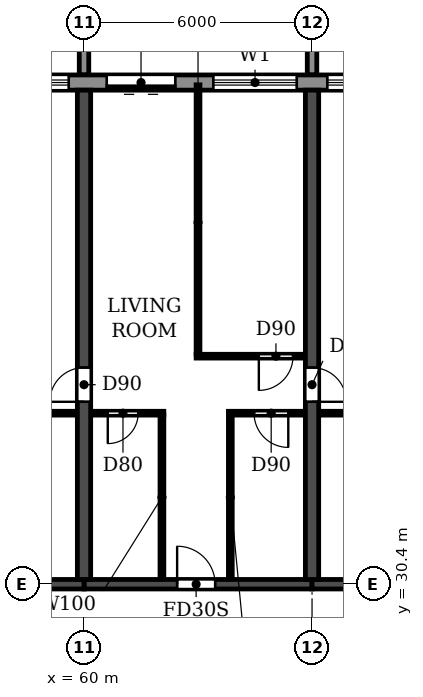
"""IFC4 building model, lengths in metres.
Left out: names, types, materials, properties, quantities, classifications, styles, units other than length and angle.
Written with IfcOpenShell. Run it as: python <this file> out.ifc"""

import sys

from ifc_helpers import new_model, si_unit, direction, frame, frame_2d, origin, place, context, subcontext, project, spatial, polyline, rectangle, outline, extrude, source, transform, mapped, element, fill, save


model = new_model("IFC4")
c1 = context("Model", 3, precision=1e-05, world=origin(), true_north=direction((0.0, 1.0)))
c2 = subcontext(c1, "Body", "Model", "MODEL_VIEW")
j1 = project(units=[si_unit("LENGTHUNIT", "METRE"), si_unit("PLANEANGLEUNIT", "RADIAN")], contexts=[c1])
p1 = place(None, origin())
s1 = spatial("IfcSite", under=j1, at=p1, CompositionType="ELEMENT")
p2 = place(p1, origin())
s2 = spatial("IfcBuilding", under=s1, at=p2, CompositionType="ELEMENT")
p3 = place(p2, frame((0.0, 0.0, 82.8)))
s3 = spatial("IfcBuildingStorey", under=s2, at=p3, CompositionType="ELEMENT", Elevation=82.8)
p4 = place(p3, frame((60.0, 30.525, 0.0), z_axis=(0.0, 0.0, 1.0), x_axis=(0.0, 1.0, 0.0)))
e1 = element("IfcWall", 1, at=p4, inside=s3, PredefinedType="SHEAR", context=c2, shape_type="SweptSolid", body=[
    extrude(rectangle(XDim=12.875, YDim=0.35, at=frame_2d((6.438, 0.0))), origin(), (0.0, 0.0, 1.0), 3.06),
])
p5 = place(p4, frame((4.675, 0.0, 0.0)))
e2 = element("IfcOpeningElement", 2, at=p5, cuts=e1, PredefinedType="OPENING", context=c2, shape_type="SweptSolid", body=[
    extrude(rectangle(XDim=0.9, YDim=2.1, at=frame_2d((0.45, 1.05))), frame((0.0, 0.185, 0.0), z_axis=(0.0, -1.0, 0.0), x_axis=(1.0, 0.0, 0.0)), (0.0, 0.0, 1.0), 0.37),
])
p6 = place(p3, frame((66.0, 30.525, 0.0), z_axis=(0.0, 0.0, 1.0), x_axis=(0.0, 1.0, 0.0)))
e3 = element("IfcWall", 3, at=p6, inside=s3, PredefinedType="SHEAR", context=c2, shape_type="SweptSolid", body=[
    extrude(rectangle(XDim=12.875, YDim=0.35, at=frame_2d((6.438, 0.0))), origin(), (0.0, 0.0, 1.0), 3.06),
])
p7 = place(p6, frame((4.675, 0.0, 0.0)))
e4 = element("IfcOpeningElement", 4, at=p7, cuts=e3, PredefinedType="OPENING", context=c2, shape_type="SweptSolid", body=[
    extrude(rectangle(XDim=0.9, YDim=2.1, at=frame_2d((0.45, 1.05))), frame((0.0, 0.185, 0.0), z_axis=(0.0, -1.0, 0.0), x_axis=(1.0, 0.0, 0.0)), (0.0, 0.0, 1.0), 0.37),
])
p8 = place(p3, frame((54.0, 30.4, 0.0), z_axis=(0.0, 0.0, 1.0), x_axis=(1.0, 0.0, 0.0)))
e5 = element("IfcWall", 5, at=p8, inside=s3, PredefinedType="SHEAR", context=c2, shape_type="SweptSolid", body=[
    extrude(rectangle(XDim=6.0, YDim=0.25, at=frame_2d((3.0, 0.0))), origin(), (0.0, 0.0, 1.0), 2.46),
])
p9 = place(p3, frame((60.0, 30.4, 0.0), z_axis=(0.0, 0.0, 1.0), x_axis=(1.0, 0.0, 0.0)))
e6 = element("IfcWall", 6, at=p9, inside=s3, PredefinedType="SHEAR", context=c2, shape_type="SweptSolid", body=[
    extrude(rectangle(XDim=6.0, YDim=0.25, at=frame_2d((3.0, 0.0))), origin(), (0.0, 0.0, 1.0), 2.46),
])
p10 = place(p9, frame((2.45, 0.0, 0.0)))
e7 = element("IfcOpeningElement", 7, at=p10, cuts=e6, PredefinedType="OPENING", context=c2, shape_type="SweptSolid", body=[
    extrude(rectangle(XDim=1.0, YDim=2.1, at=frame_2d((0.5, 1.05))), frame((0.0, 0.135, 0.0), z_axis=(0.0, -1.0, 0.0), x_axis=(1.0, 0.0, 0.0)), (0.0, 0.0, 1.0), 0.27),
])
p11 = place(p3, frame((66.0, 30.4, 0.0), z_axis=(0.0, 0.0, 1.0), x_axis=(1.0, 0.0, 0.0)))
e8 = element("IfcWall", 8, at=p11, inside=s3, PredefinedType="SHEAR", context=c2, shape_type="SweptSolid", body=[
    extrude(rectangle(XDim=6.0, YDim=0.25, at=frame_2d((3.0, 0.0))), origin(), (0.0, 0.0, 1.0), 2.46),
])
p12 = place(p3, frame((91.317, 43.6, 0.0), z_axis=(0.0, 0.0, 1.0), x_axis=(-1.0, 0.0, 0.0)))
e9 = element("IfcWall", 9, at=p12, inside=s3, PredefinedType="STANDARD", context=c2, shape_type="SweptSolid", body=[
    extrude(rectangle(XDim=80.634, YDim=0.4, at=frame_2d((40.317, 0.0))), origin(), (0.0, 0.0, 1.0), 3.06),
])
p13 = place(p12, frame((76.717, 0.0, 0.9)))
e10 = element("IfcOpeningElement", 10, at=p13, cuts=e9, PredefinedType="OPENING", context=c2, shape_type="SweptSolid", body=[
    extrude(rectangle(XDim=2.2, YDim=1.5, at=frame_2d((1.1, 0.75))), frame((0.0, 0.21, 0.0), z_axis=(0.0, -1.0, 0.0), x_axis=(1.0, 0.0, 0.0)), (0.0, 0.0, 1.0), 0.42),
])
p14 = place(p12, frame((73.917, 0.0, 0.0)))
e11 = element("IfcOpeningElement", 11, at=p14, cuts=e9, PredefinedType="OPENING", context=c2, shape_type="SweptSolid", body=[
    extrude(rectangle(XDim=1.8, YDim=2.4, at=frame_2d((0.9, 1.2))), frame((0.0, 0.21, 0.0), z_axis=(0.0, -1.0, 0.0), x_axis=(1.0, 0.0, 0.0)), (0.0, 0.0, 1.0), 0.42),
])
p15 = place(p12, frame((70.717, 0.0, 0.9)))
e12 = element("IfcOpeningElement", 12, at=p15, cuts=e9, PredefinedType="OPENING", context=c2, shape_type="SweptSolid", body=[
    extrude(rectangle(XDim=2.2, YDim=1.5, at=frame_2d((1.1, 0.75))), frame((0.0, 0.21, 0.0), z_axis=(0.0, -1.0, 0.0), x_axis=(1.0, 0.0, 0.0)), (0.0, 0.0, 1.0), 0.42),
])
p16 = place(p12, frame((67.717, 0.0, 0.9)))
e13 = element("IfcOpeningElement", 13, at=p16, cuts=e9, PredefinedType="OPENING", context=c2, shape_type="SweptSolid", body=[
    extrude(rectangle(XDim=2.2, YDim=1.5, at=frame_2d((1.1, 0.75))), frame((0.0, 0.21, 0.0), z_axis=(0.0, -1.0, 0.0), x_axis=(1.0, 0.0, 0.0)), (0.0, 0.0, 1.0), 0.42),
])
p17 = place(p12, frame((64.717, 0.0, 0.9)))
e14 = element("IfcOpeningElement", 14, at=p17, cuts=e9, PredefinedType="OPENING", context=c2, shape_type="SweptSolid", body=[
    extrude(rectangle(XDim=2.2, YDim=1.5, at=frame_2d((1.1, 0.75))), frame((0.0, 0.21, 0.0), z_axis=(0.0, -1.0, 0.0), x_axis=(1.0, 0.0, 0.0)), (0.0, 0.0, 1.0), 0.42),
])
p18 = place(p12, frame((61.917, 0.0, 0.0)))
e15 = element("IfcOpeningElement", 15, at=p18, cuts=e9, PredefinedType="OPENING", context=c2, shape_type="SweptSolid", body=[
    extrude(rectangle(XDim=1.8, YDim=2.4, at=frame_2d((0.9, 1.2))), frame((0.0, 0.21, 0.0), z_axis=(0.0, -1.0, 0.0), x_axis=(1.0, 0.0, 0.0)), (0.0, 0.0, 1.0), 0.42),
])
p19 = place(p12, frame((58.917, 0.0, 0.0)))
e16 = element("IfcOpeningElement", 16, at=p19, cuts=e9, PredefinedType="OPENING", context=c2, shape_type="SweptSolid", body=[
    extrude(rectangle(XDim=1.8, YDim=2.4, at=frame_2d((0.9, 1.2))), frame((0.0, 0.21, 0.0), z_axis=(0.0, -1.0, 0.0), x_axis=(1.0, 0.0, 0.0)), (0.0, 0.0, 1.0), 0.42),
])
p20 = place(p12, frame((55.717, 0.0, 0.9)))
e17 = element("IfcOpeningElement", 17, at=p20, cuts=e9, PredefinedType="OPENING", context=c2, shape_type="SweptSolid", body=[
    extrude(rectangle(XDim=2.2, YDim=1.5, at=frame_2d((1.1, 0.75))), frame((0.0, 0.21, 0.0), z_axis=(0.0, -1.0, 0.0), x_axis=(1.0, 0.0, 0.0)), (0.0, 0.0, 1.0), 0.42),
])
p21 = place(p12, frame((52.717, 0.0, 0.9)))
e18 = element("IfcOpeningElement", 18, at=p21, cuts=e9, PredefinedType="OPENING", context=c2, shape_type="SweptSolid", body=[
    extrude(rectangle(XDim=2.2, YDim=1.5, at=frame_2d((1.1, 0.75))), frame((0.0, 0.21, 0.0), z_axis=(0.0, -1.0, 0.0), x_axis=(1.0, 0.0, 0.0)), (0.0, 0.0, 1.0), 0.42),
])
p22 = place(p12, frame((49.917, 0.0, 0.0)))
e19 = element("IfcOpeningElement", 19, at=p22, cuts=e9, PredefinedType="OPENING", context=c2, shape_type="SweptSolid", body=[
    extrude(rectangle(XDim=1.8, YDim=2.4, at=frame_2d((0.9, 1.2))), frame((0.0, 0.21, 0.0), z_axis=(0.0, -1.0, 0.0), x_axis=(1.0, 0.0, 0.0)), (0.0, 0.0, 1.0), 0.42),
])
p23 = place(p12, frame((46.717, 0.0, 0.9)))
e20 = element("IfcOpeningElement", 20, at=p23, cuts=e9, PredefinedType="OPENING", context=c2, shape_type="SweptSolid", body=[
    extrude(rectangle(XDim=2.2, YDim=1.5, at=frame_2d((1.1, 0.75))), frame((0.0, 0.21, 0.0), z_axis=(0.0, -1.0, 0.0), x_axis=(1.0, 0.0, 0.0)), (0.0, 0.0, 1.0), 0.42),
])
p24 = place(p12, frame((43.717, 0.0, 0.9)))
e21 = element("IfcOpeningElement", 21, at=p24, cuts=e9, PredefinedType="OPENING", context=c2, shape_type="SweptSolid", body=[
    extrude(rectangle(XDim=2.2, YDim=1.5, at=frame_2d((1.1, 0.75))), frame((0.0, 0.21, 0.0), z_axis=(0.0, -1.0, 0.0), x_axis=(1.0, 0.0, 0.0)), (0.0, 0.0, 1.0), 0.42),
])
p25 = place(p12, frame((40.717, 0.0, 0.9)))
e22 = element("IfcOpeningElement", 22, at=p25, cuts=e9, PredefinedType="OPENING", context=c2, shape_type="SweptSolid", body=[
    extrude(rectangle(XDim=2.2, YDim=1.5, at=frame_2d((1.1, 0.75))), frame((0.0, 0.21, 0.0), z_axis=(0.0, -1.0, 0.0), x_axis=(1.0, 0.0, 0.0)), (0.0, 0.0, 1.0), 0.42),
])
p26 = place(p12, frame((37.917, 0.0, 0.0)))
e23 = element("IfcOpeningElement", 23, at=p26, cuts=e9, PredefinedType="OPENING", context=c2, shape_type="SweptSolid", body=[
    extrude(rectangle(XDim=1.8, YDim=2.4, at=frame_2d((0.9, 1.2))), frame((0.0, 0.21, 0.0), z_axis=(0.0, -1.0, 0.0), x_axis=(1.0, 0.0, 0.0)), (0.0, 0.0, 1.0), 0.42),
])
p27 = place(p12, frame((34.717, 0.0, 0.9)))
e24 = element("IfcOpeningElement", 24, at=p27, cuts=e9, PredefinedType="OPENING", context=c2, shape_type="SweptSolid", body=[
    extrude(rectangle(XDim=2.2, YDim=1.5, at=frame_2d((1.1, 0.75))), frame((0.0, 0.21, 0.0), z_axis=(0.0, -1.0, 0.0), x_axis=(1.0, 0.0, 0.0)), (0.0, 0.0, 1.0), 0.42),
])
p28 = place(p12, frame((31.717, 0.0, 0.9)))
e25 = element("IfcOpeningElement", 25, at=p28, cuts=e9, PredefinedType="OPENING", context=c2, shape_type="SweptSolid", body=[
    extrude(rectangle(XDim=2.2, YDim=1.5, at=frame_2d((1.1, 0.75))), frame((0.0, 0.21, 0.0), z_axis=(0.0, -1.0, 0.0), x_axis=(1.0, 0.0, 0.0)), (0.0, 0.0, 1.0), 0.42),
])
p29 = place(p12, frame((28.917, 0.0, 0.0)))
e26 = element("IfcOpeningElement", 26, at=p29, cuts=e9, PredefinedType="OPENING", context=c2, shape_type="SweptSolid", body=[
    extrude(rectangle(XDim=1.8, YDim=2.4, at=frame_2d((0.9, 1.2))), frame((0.0, 0.21, 0.0), z_axis=(0.0, -1.0, 0.0), x_axis=(1.0, 0.0, 0.0)), (0.0, 0.0, 1.0), 0.42),
])
p30 = place(p12, frame((25.717, 0.0, 0.9)))
e27 = element("IfcOpeningElement", 27, at=p30, cuts=e9, PredefinedType="OPENING", context=c2, shape_type="SweptSolid", body=[
    extrude(rectangle(XDim=2.2, YDim=1.5, at=frame_2d((1.1, 0.75))), frame((0.0, 0.21, 0.0), z_axis=(0.0, -1.0, 0.0), x_axis=(1.0, 0.0, 0.0)), (0.0, 0.0, 1.0), 0.42),
])
p31 = place(p12, frame((22.717, 0.0, 0.9)))
e28 = element("IfcOpeningElement", 28, at=p31, cuts=e9, PredefinedType="OPENING", context=c2, shape_type="SweptSolid", body=[
    extrude(rectangle(XDim=2.2, YDim=1.5, at=frame_2d((1.1, 0.75))), frame((0.0, 0.21, 0.0), z_axis=(0.0, -1.0, 0.0), x_axis=(1.0, 0.0, 0.0)), (0.0, 0.0, 1.0), 0.42),
])
p32 = place(p12, frame((19.717, 0.0, 0.9)))
e29 = element("IfcOpeningElement", 29, at=p32, cuts=e9, PredefinedType="OPENING", context=c2, shape_type="SweptSolid", body=[
    extrude(rectangle(XDim=2.2, YDim=1.5, at=frame_2d((1.1, 0.75))), frame((0.0, 0.21, 0.0), z_axis=(0.0, -1.0, 0.0), x_axis=(1.0, 0.0, 0.0)), (0.0, 0.0, 1.0), 0.42),
])
p33 = place(p12, frame((16.717, 0.0, 0.9)))
e30 = element("IfcOpeningElement", 30, at=p33, cuts=e9, PredefinedType="OPENING", context=c2, shape_type="SweptSolid", body=[
    extrude(rectangle(XDim=2.2, YDim=1.5, at=frame_2d((1.1, 0.75))), frame((0.0, 0.21, 0.0), z_axis=(0.0, -1.0, 0.0), x_axis=(1.0, 0.0, 0.0)), (0.0, 0.0, 1.0), 0.42),
])
p34 = place(p12, frame((13.917, 0.0, 0.0)))
e31 = element("IfcOpeningElement", 31, at=p34, cuts=e9, PredefinedType="OPENING", context=c2, shape_type="SweptSolid", body=[
    extrude(rectangle(XDim=1.8, YDim=2.4, at=frame_2d((0.9, 1.2))), frame((0.0, 0.21, 0.0), z_axis=(0.0, -1.0, 0.0), x_axis=(1.0, 0.0, 0.0)), (0.0, 0.0, 1.0), 0.42),
])
p35 = place(p12, frame((10.717, 0.0, 0.9)))
e32 = element("IfcOpeningElement", 32, at=p35, cuts=e9, PredefinedType="OPENING", context=c2, shape_type="SweptSolid", body=[
    extrude(rectangle(XDim=2.2, YDim=1.5, at=frame_2d((1.1, 0.75))), frame((0.0, 0.21, 0.0), z_axis=(0.0, -1.0, 0.0), x_axis=(1.0, 0.0, 0.0)), (0.0, 0.0, 1.0), 0.42),
])
p36 = place(p12, frame((7.717, 0.0, 0.9)))
e33 = element("IfcOpeningElement", 33, at=p36, cuts=e9, PredefinedType="OPENING", context=c2, shape_type="SweptSolid", body=[
    extrude(rectangle(XDim=2.2, YDim=1.5, at=frame_2d((1.1, 0.75))), frame((0.0, 0.21, 0.0), z_axis=(0.0, -1.0, 0.0), x_axis=(1.0, 0.0, 0.0)), (0.0, 0.0, 1.0), 0.42),
])
p37 = place(p12, frame((4.917, 0.0, 0.0)))
e34 = element("IfcOpeningElement", 34, at=p37, cuts=e9, PredefinedType="OPENING", context=c2, shape_type="SweptSolid", body=[
    extrude(rectangle(XDim=1.8, YDim=2.4, at=frame_2d((0.9, 1.2))), frame((0.0, 0.21, 0.0), z_axis=(0.0, -1.0, 0.0), x_axis=(1.0, 0.0, 0.0)), (0.0, 0.0, 1.0), 0.42),
])
p38 = place(p12, frame((1.717, 0.0, 0.9)))
e35 = element("IfcOpeningElement", 35, at=p38, cuts=e9, PredefinedType="OPENING", context=c2, shape_type="SweptSolid", body=[
    extrude(rectangle(XDim=2.2, YDim=1.5, at=frame_2d((1.1, 0.75))), frame((0.0, 0.21, 0.0), z_axis=(0.0, -1.0, 0.0), x_axis=(1.0, 0.0, 0.0)), (0.0, 0.0, 1.0), 0.42),
])
m1 = source(origin(), c2, "Body", "SweptSolid", [
    extrude(outline(polyline([(0.0, 0.0), (0.25, 0.0), (0.25, 3.1), (0.0, 3.1), (0.0, 0.0)])), origin(), (0.0, 0.0, 1.0), 3.1),
])
for number, where in (
    (36, (59.875, 43.8, 0.0)),
    (37, (65.875, 43.8, 0.0)),
):
    element("IfcWall", number, at=place(p3, frame(where)), inside=s3, PredefinedType="STANDARD", context=c2, shape_type="MappedRepresentation", body=[
        mapped(m1, transform((0.0, 0.0, 0.0))),
    ])
p39 = place(p3, frame((57.1, 34.9, 0.0), z_axis=(0.0, 0.0, 1.0), x_axis=(1.0, 0.0, 0.0)))
e38 = element("IfcWall", 38, at=p39, inside=s3, PredefinedType="PARTITIONING", context=c2, shape_type="SweptSolid", body=[
    extrude(rectangle(XDim=2.715, YDim=0.1, at=frame_2d((1.357, 0.0))), origin(), (0.0, 0.0, 1.0), 3.06),
])
p40 = place(p39, frame((1.0, 0.0, 0.0)))
e39 = element("IfcOpeningElement", 39, at=p40, cuts=e38, PredefinedType="OPENING", context=c2, shape_type="SweptSolid", body=[
    extrude(rectangle(XDim=0.8, YDim=2.1, at=frame_2d((0.4, 1.05))), frame((0.0, 0.06, 0.0), z_axis=(0.0, -1.0, 0.0), x_axis=(1.0, 0.0, 0.0)), (0.0, 0.0, 1.0), 0.12),
])
p41 = place(p3, frame((60.185, 34.9, 0.0), z_axis=(0.0, 0.0, 1.0), x_axis=(1.0, 0.0, 0.0)))
e40 = element("IfcWall", 40, at=p41, inside=s3, PredefinedType="PARTITIONING", context=c2, shape_type="SweptSolid", body=[
    extrude(rectangle(XDim=1.915, YDim=0.1, at=frame_2d((0.958, 0.0))), origin(), (0.0, 0.0, 1.0), 3.06),
])
p42 = place(p41, frame((0.44, 0.0, 0.0)))
e41 = element("IfcOpeningElement", 41, at=p42, cuts=e40, PredefinedType="OPENING", context=c2, shape_type="SweptSolid", body=[
    extrude(rectangle(XDim=0.8, YDim=2.1, at=frame_2d((0.4, 1.05))), frame((0.0, 0.06, 0.0), z_axis=(0.0, -1.0, 0.0), x_axis=(1.0, 0.0, 0.0)), (0.0, 0.0, 1.0), 0.12),
])
p43 = place(p3, frame((63.8, 34.9, 0.0), z_axis=(0.0, 0.0, 1.0), x_axis=(1.0, 0.0, 0.0)))
e42 = element("IfcWall", 42, at=p43, inside=s3, PredefinedType="PARTITIONING", context=c2, shape_type="SweptSolid", body=[
    extrude(rectangle(XDim=2.015, YDim=0.1, at=frame_2d((1.007, 0.0))), origin(), (0.0, 0.0, 1.0), 3.06),
])
p44 = place(p43, frame((0.675, 0.0, 0.0)))
e43 = element("IfcOpeningElement", 43, at=p44, cuts=e42, PredefinedType="OPENING", context=c2, shape_type="SweptSolid", body=[
    extrude(rectangle(XDim=0.9, YDim=2.1, at=frame_2d((0.45, 1.05))), frame((0.0, 0.06, 0.0), z_axis=(0.0, -1.0, 0.0), x_axis=(1.0, 0.0, 0.0)), (0.0, 0.0, 1.0), 0.12),
])
p45 = place(p3, frame((66.185, 34.9, 0.0), z_axis=(0.0, 0.0, 1.0), x_axis=(1.0, 0.0, 0.0)))
e44 = element("IfcWall", 44, at=p45, inside=s3, PredefinedType="PARTITIONING", context=c2, shape_type="SweptSolid", body=[
    extrude(rectangle(XDim=2.915, YDim=0.1, at=frame_2d((1.458, 0.0))), origin(), (0.0, 0.0, 1.0), 3.06),
])
p46 = place(p45, frame((0.915, 0.0, 0.0)))
e45 = element("IfcOpeningElement", 45, at=p46, cuts=e44, PredefinedType="OPENING", context=c2, shape_type="SweptSolid", body=[
    extrude(rectangle(XDim=0.8, YDim=2.1, at=frame_2d((0.4, 1.05))), frame((0.0, 0.06, 0.0), z_axis=(0.0, -1.0, 0.0), x_axis=(1.0, 0.0, 0.0)), (0.0, 0.0, 1.0), 0.12),
])
p47 = place(p3, frame((62.95, 36.4, 0.0), z_axis=(0.0, 0.0, 1.0), x_axis=(1.0, 0.0, 0.0)))
e46 = element("IfcWall", 46, at=p47, inside=s3, PredefinedType="PARTITIONING", context=c2, shape_type="SweptSolid", body=[
    extrude(rectangle(XDim=2.865, YDim=0.1, at=frame_2d((1.433, 0.0))), origin(), (0.0, 0.0, 1.0), 3.06),
])
p48 = place(p47, frame((1.65, 0.0, 0.0)))
e47 = element("IfcOpeningElement", 47, at=p48, cuts=e46, PredefinedType="OPENING", context=c2, shape_type="SweptSolid", body=[
    extrude(rectangle(XDim=0.9, YDim=2.1, at=frame_2d((0.45, 1.05))), frame((0.0, 0.06, 0.0), z_axis=(0.0, -1.0, 0.0), x_axis=(1.0, 0.0, 0.0)), (0.0, 0.0, 1.0), 0.12),
])
p49 = place(p3, frame((62.05, 30.535, 0.0), z_axis=(0.0, 0.0, 1.0), x_axis=(0.0, 1.0, 0.0)))
e48 = element("IfcWall", 48, at=p49, inside=s3, PredefinedType="PARTITIONING", context=c2, shape_type="SweptSolid", body=[
    extrude(rectangle(XDim=4.315, YDim=0.1, at=frame_2d((2.158, 0.0))), origin(), (0.0, 0.0, 1.0), 3.06),
])
p50 = place(p3, frame((63.0, 36.45, 0.0), z_axis=(0.0, 0.0, 1.0), x_axis=(0.0, 1.0, 0.0)))
e49 = element("IfcWall", 49, at=p50, inside=s3, PredefinedType="PARTITIONING", context=c2, shape_type="SweptSolid", body=[
    extrude(rectangle(XDim=7.09, YDim=0.1, at=frame_2d((3.545, 0.0))), origin(), (0.0, 0.0, 1.0), 3.06),
])
p51 = place(p3, frame((63.85, 30.535, 0.0), z_axis=(0.0, 0.0, 1.0), x_axis=(0.0, 1.0, 0.0)))
e50 = element("IfcWall", 50, at=p51, inside=s3, PredefinedType="PARTITIONING", context=c2, shape_type="SweptSolid", body=[
    extrude(rectangle(XDim=4.315, YDim=0.1, at=frame_2d((2.158, 0.0))), origin(), (0.0, 0.0, 1.0), 3.06),
])
p52 = place(p28, origin())
e51 = element("IfcWindow", 51, at=p52, inside=s3, PartitioningType="DOUBLE_PANEL_HORIZONTAL", PredefinedType="WINDOW", context=c2, shape_type="SweptSolid", body=[
    extrude(rectangle(XDim=2.2, YDim=1.5, at=frame_2d((1.1, 0.75))), frame((0.0, 0.03, 0.0), z_axis=(0.0, -1.0, 0.0), x_axis=(1.0, 0.0, 0.0)), (0.0, 0.0, 1.0), 0.06),
])
fill(e25, e51)
p53 = place(p29, origin())
e52 = element("IfcDoor", 52, at=p53, inside=s3, OperationType="DOUBLE_DOOR_SLIDING", PredefinedType="DOOR", context=c2, shape_type="SweptSolid", body=[
    extrude(rectangle(XDim=1.8, YDim=2.4, at=frame_2d((0.9, 1.2))), frame((0.0, 0.025, 0.0), z_axis=(0.0, -1.0, 0.0), x_axis=(1.0, 0.0, 0.0)), (0.0, 0.0, 1.0), 0.05),
])
fill(e26, e52)
p54 = place(p30, origin())
e53 = element("IfcWindow", 53, at=p54, inside=s3, PartitioningType="DOUBLE_PANEL_HORIZONTAL", PredefinedType="WINDOW", context=c2, shape_type="SweptSolid", body=[
    extrude(rectangle(XDim=2.2, YDim=1.5, at=frame_2d((1.1, 0.75))), frame((0.0, 0.03, 0.0), z_axis=(0.0, -1.0, 0.0), x_axis=(1.0, 0.0, 0.0)), (0.0, 0.0, 1.0), 0.06),
])
fill(e27, e53)
p55 = place(p31, origin())
e54 = element("IfcWindow", 54, at=p55, inside=s3, PartitioningType="DOUBLE_PANEL_HORIZONTAL", PredefinedType="WINDOW", context=c2, shape_type="SweptSolid", body=[
    extrude(rectangle(XDim=2.2, YDim=1.5, at=frame_2d((1.1, 0.75))), frame((0.0, 0.03, 0.0), z_axis=(0.0, -1.0, 0.0), x_axis=(1.0, 0.0, 0.0)), (0.0, 0.0, 1.0), 0.06),
])
fill(e28, e54)
p56 = place(p5, origin())
e55 = element("IfcDoor", 55, at=p56, inside=s3, OperationType="SINGLE_SWING_LEFT", PredefinedType="DOOR", context=c2, shape_type="SweptSolid", body=[
    extrude(rectangle(XDim=0.9, YDim=2.1, at=frame_2d((0.45, 1.05))), frame((0.0, 0.025, 0.0), z_axis=(0.0, -1.0, 0.0), x_axis=(1.0, 0.0, 0.0)), (0.0, 0.0, 1.0), 0.05),
])
fill(e2, e55)
p57 = place(p42, frame((0.8, 0.0, 0.0), z_axis=(0.0, 0.0, 1.0), x_axis=(-1.0, 0.0, 0.0)))
e56 = element("IfcDoor", 56, at=p57, inside=s3, OperationType="SINGLE_SWING_RIGHT", PredefinedType="DOOR", context=c2, shape_type="SweptSolid", body=[
    extrude(rectangle(XDim=0.8, YDim=2.1, at=frame_2d((0.4, 1.05))), frame((0.0, 0.025, 0.0), z_axis=(0.0, -1.0, 0.0), x_axis=(1.0, 0.0, 0.0)), (0.0, 0.0, 1.0), 0.05),
])
fill(e41, e56)
p58 = place(p10, origin())
e57 = element("IfcDoor", 57, at=p58, inside=s3, OperationType="SINGLE_SWING_LEFT", PredefinedType="DOOR", context=c2, shape_type="SweptSolid", body=[
    extrude(rectangle(XDim=1.0, YDim=2.1, at=frame_2d((0.5, 1.05))), frame((0.0, 0.025, 0.0), z_axis=(0.0, -1.0, 0.0), x_axis=(1.0, 0.0, 0.0)), (0.0, 0.0, 1.0), 0.05),
])
fill(e7, e57)
p59 = place(p44, frame((0.9, 0.0, 0.0), z_axis=(0.0, 0.0, 1.0), x_axis=(-1.0, 0.0, 0.0)))
e58 = element("IfcDoor", 58, at=p59, inside=s3, OperationType="SINGLE_SWING_LEFT", PredefinedType="DOOR", context=c2, shape_type="SweptSolid", body=[
    extrude(rectangle(XDim=0.9, YDim=2.1, at=frame_2d((0.45, 1.05))), frame((0.0, 0.025, 0.0), z_axis=(0.0, -1.0, 0.0), x_axis=(1.0, 0.0, 0.0)), (0.0, 0.0, 1.0), 0.05),
])
fill(e43, e58)
p60 = place(p48, frame((0.9, 0.0, 0.0), z_axis=(0.0, 0.0, 1.0), x_axis=(-1.0, 0.0, 0.0)))
e59 = element("IfcDoor", 59, at=p60, inside=s3, OperationType="SINGLE_SWING_RIGHT", PredefinedType="DOOR", context=c2, shape_type="SweptSolid", body=[
    extrude(rectangle(XDim=0.9, YDim=2.1, at=frame_2d((0.45, 1.05))), frame((0.0, 0.025, 0.0), z_axis=(0.0, -1.0, 0.0), x_axis=(1.0, 0.0, 0.0)), (0.0, 0.0, 1.0), 0.05),
])
fill(e47, e59)
p61 = place(p7, frame((0.9, 0.0, 0.0), z_axis=(0.0, 0.0, 1.0), x_axis=(-1.0, 0.0, 0.0)))
e60 = element("IfcDoor", 60, at=p61, inside=s3, OperationType="SINGLE_SWING_RIGHT", PredefinedType="DOOR", context=c2, shape_type="SweptSolid", body=[
    extrude(rectangle(XDim=0.9, YDim=2.1, at=frame_2d((0.45, 1.05))), frame((0.0, 0.025, 0.0), z_axis=(0.0, -1.0, 0.0), x_axis=(1.0, 0.0, 0.0)), (0.0, 0.0, 1.0), 0.05),
])
fill(e4, e60)
save(model, sys.argv[1])
